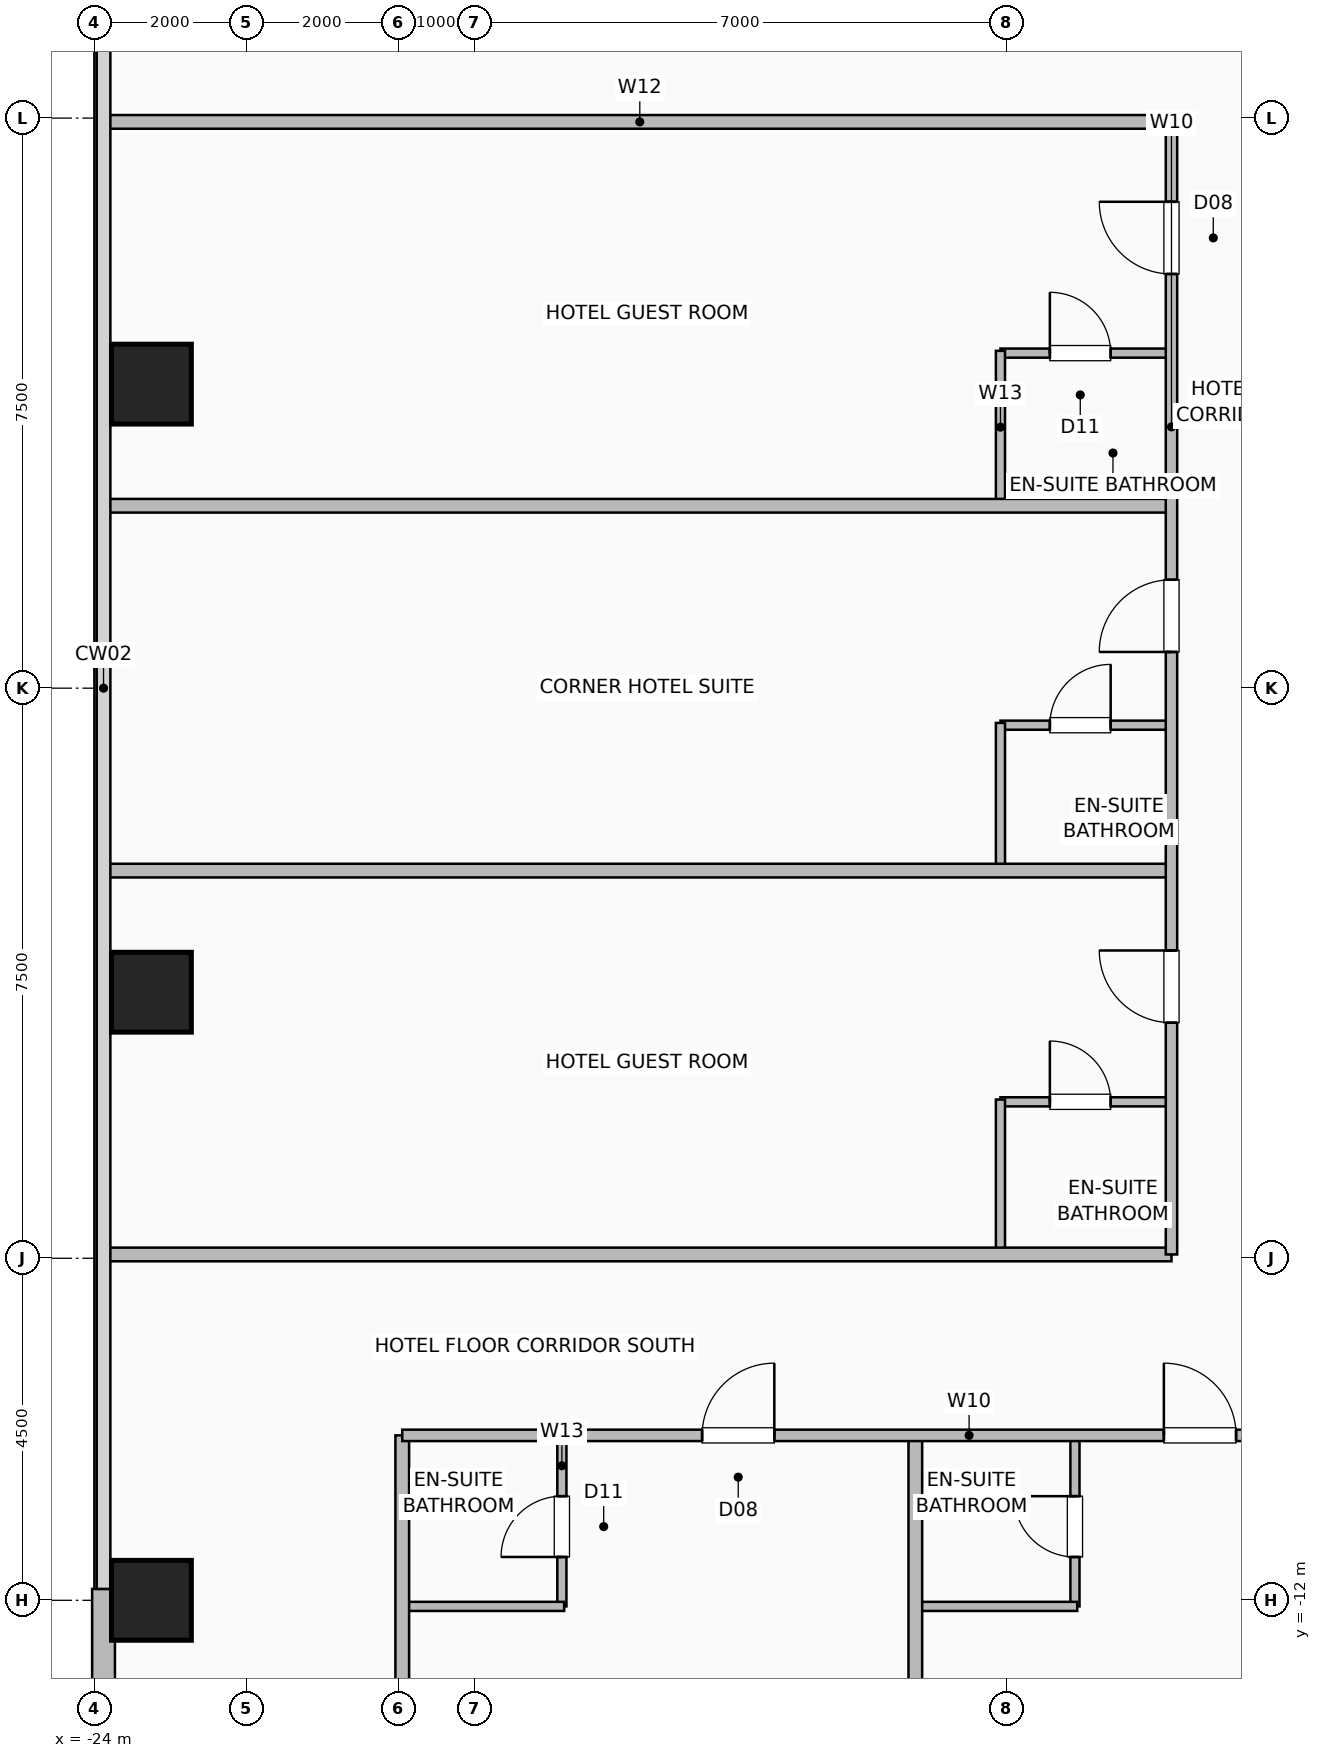
"""IFC4 building model, lengths in metres.
Left out: names, types, materials, properties, quantities, classifications, styles, units other than length and angle.
Written with IfcOpenShell. Run it as: python <this file> out.ifc"""

import sys

from ifc_helpers import new_model, si_unit, direction, frame, frame_2d, origin, origin_2d, place, context, subcontext, project, spatial, rectangle, hollow_rectangle, extrude, element, fill, save


model = new_model("IFC4")
c1 = context("Model", 3, precision=1e-05, world=origin(), true_north=direction((0.0, 1.0)))
c2 = subcontext(c1, "Body", "Model", "MODEL_VIEW")
j1 = project(units=[si_unit("LENGTHUNIT", "METRE"), si_unit("PLANEANGLEUNIT", "RADIAN")], contexts=[c1])
p1 = place(None, origin())
s1 = spatial("IfcSite", under=j1, at=p1, CompositionType="ELEMENT")
p2 = place(p1, origin())
s2 = spatial("IfcBuilding", under=s1, at=p2, CompositionType="ELEMENT")
p3 = place(p2, frame((0.0, 0.0, 34.0)))
s3 = spatial("IfcBuildingStorey", under=s2, at=p3, CompositionType="ELEMENT", Elevation=34.0)
for number, where, z_axis, x_axis in (
    (1, (-23.25, -12.0, 0.0), (0.0, 0.0, 1.0), (1.0, 0.0, 0.0)),
    (2, (-23.25, -4.0, 0.0), (0.0, 0.0, 1.0), (1.0, 0.0, 0.0)),
    (3, (-23.25, 4.0, 0.0), (0.0, 0.0, 1.0), (1.0, 0.0, 0.0)),
):
    element("IfcColumn", number, at=place(p3, frame(where, z_axis=z_axis, x_axis=x_axis)), inside=s3, PredefinedType="COLUMN", context=c2, shape_type="SweptSolid", body=[
        extrude(hollow_rectangle(XDim=1.05, YDim=1.05, WallThickness=0.05, at=origin_2d()), origin(), (0.0, 0.0, 1.0), 3.5),
    ])
p4 = place(p3, frame((-23.88, -19.15, 0.0), z_axis=(0.0, 0.0, 1.0), x_axis=(0.0, 1.0, 0.0)))
e4 = element("IfcWall", 4, at=p4, inside=s3, PredefinedType="SOLIDWALL", context=c2, shape_type="SweptSolid", body=[
    extrude(rectangle(XDim=7.3, YDim=0.3, at=frame_2d((3.65, 0.0))), origin(), (0.0, 0.0, 1.0), 3.25),
])
p5 = place(p3, frame((-17.85, -12.08, 0.0), z_axis=(0.0, 0.0, 1.0), x_axis=(0.0, 1.0, 0.0)))
e5 = element("IfcWall", 5, at=p5, inside=s3, PredefinedType="PLUMBINGWALL", context=c2, shape_type="SweptSolid", body=[
    extrude(rectangle(XDim=2.25, YDim=0.12, at=frame_2d((1.125, 0.0))), origin(), (0.0, 0.0, 1.0), 3.25),
])
p6 = place(p5, frame((0.65, 0.0, 0.0)))
e6 = element("IfcOpeningElement", 6, at=p6, cuts=e5, PredefinedType="OPENING", context=c2, shape_type="SweptSolid", body=[
    extrude(rectangle(XDim=0.8, YDim=2.05, at=frame_2d((0.4, 1.025))), frame((0.0, 0.07, 0.0), z_axis=(0.0, -1.0, 0.0), x_axis=(1.0, 0.0, 0.0)), (0.0, 0.0, 1.0), 0.14),
])
p7 = place(p3, frame((-19.92, -12.08, 0.0), z_axis=(0.0, 0.0, 1.0), x_axis=(1.0, 0.0, 0.0)))
e7 = element("IfcWall", 7, at=p7, inside=s3, PredefinedType="PLUMBINGWALL", context=c2, shape_type="SweptSolid", body=[
    extrude(rectangle(XDim=2.1, YDim=0.12, at=frame_2d((1.05, 0.0))), origin(), (0.0, 0.0, 1.0), 3.25),
])
p8 = place(p3, frame((-11.1, -12.08, 0.0), z_axis=(0.0, 0.0, 1.0), x_axis=(0.0, 1.0, 0.0)))
e8 = element("IfcWall", 8, at=p8, inside=s3, PredefinedType="PLUMBINGWALL", context=c2, shape_type="SweptSolid", body=[
    extrude(rectangle(XDim=2.25, YDim=0.12, at=frame_2d((1.125, 0.0))), origin(), (0.0, 0.0, 1.0), 3.25),
])
p9 = place(p8, frame((0.65, 0.0, 0.0)))
e9 = element("IfcOpeningElement", 9, at=p9, cuts=e8, PredefinedType="OPENING", context=c2, shape_type="SweptSolid", body=[
    extrude(rectangle(XDim=0.8, YDim=2.05, at=frame_2d((0.4, 1.025))), frame((0.0, 0.07, 0.0), z_axis=(0.0, -1.0, 0.0), x_axis=(1.0, 0.0, 0.0)), (0.0, 0.0, 1.0), 0.14),
])
p10 = place(p3, frame((-13.17, -12.08, 0.0), z_axis=(0.0, 0.0, 1.0), x_axis=(1.0, 0.0, 0.0)))
e10 = element("IfcWall", 10, at=p10, inside=s3, PredefinedType="PLUMBINGWALL", context=c2, shape_type="SweptSolid", body=[
    extrude(rectangle(XDim=2.1, YDim=0.12, at=frame_2d((1.05, 0.0))), origin(), (0.0, 0.0, 1.0), 3.25),
])
for number, where, z_axis, x_axis in (
    (11, (-19.95, -23.82, 0.0), (0.0, 0.0, 1.0), (0.0, 1.0, 0.0)),
    (12, (-13.2, -23.82, 0.0), (0.0, 0.0, 1.0), (0.0, 1.0, 0.0)),
):
    element("IfcWall", number, at=place(p3, frame(where, z_axis=z_axis, x_axis=x_axis)), inside=s3, PredefinedType="PARTITIONING", context=c2, shape_type="SweptSolid", body=[
        extrude(rectangle(XDim=13.99, YDim=0.18, at=frame_2d((6.995, 0.0))), origin(), (0.0, 0.0, 1.0), 3.25),
    ])
p11 = place(p3, frame((-19.95, -9.83, 0.0), z_axis=(0.0, 0.0, 1.0), x_axis=(1.0, 0.0, 0.0)))
e13 = element("IfcWall", 13, at=p11, inside=s3, PredefinedType="PARTITIONING", context=c2, shape_type="SweptSolid", body=[
    extrude(rectangle(XDim=39.9, YDim=0.15, at=frame_2d((19.95, 0.0))), origin(), (0.0, 0.0, 1.0), 3.25),
])
p12 = place(p11, frame((3.945, 0.0, 0.0)))
e14 = element("IfcOpeningElement", 14, at=p12, cuts=e13, PredefinedType="OPENING", context=c2, shape_type="SweptSolid", body=[
    extrude(rectangle(XDim=0.95, YDim=2.08, at=frame_2d((0.475, 1.04))), frame((0.0, 0.085, 0.0), z_axis=(0.0, -1.0, 0.0), x_axis=(1.0, 0.0, 0.0)), (0.0, 0.0, 1.0), 0.17),
])
p13 = place(p11, frame((10.02, 0.0, 0.0)))
e15 = element("IfcOpeningElement", 15, at=p13, cuts=e13, PredefinedType="OPENING", context=c2, shape_type="SweptSolid", body=[
    extrude(rectangle(XDim=0.95, YDim=2.08, at=frame_2d((0.475, 1.04))), frame((0.0, 0.085, 0.0), z_axis=(0.0, -1.0, 0.0), x_axis=(1.0, 0.0, 0.0)), (0.0, 0.0, 1.0), 0.17),
])
p14 = place(p11, frame((15.42, 0.0, 0.0)))
e16 = element("IfcOpeningElement", 16, at=p14, cuts=e13, PredefinedType="OPENING", context=c2, shape_type="SweptSolid", body=[
    extrude(rectangle(XDim=0.95, YDim=2.08, at=frame_2d((0.475, 1.04))), frame((0.0, 0.085, 0.0), z_axis=(0.0, -1.0, 0.0), x_axis=(1.0, 0.0, 0.0)), (0.0, 0.0, 1.0), 0.17),
])
p15 = place(p11, frame((20.702, 0.0, 0.0)))
e17 = element("IfcOpeningElement", 17, at=p15, cuts=e13, PredefinedType="OPENING", context=c2, shape_type="SweptSolid", body=[
    extrude(rectangle(XDim=0.95, YDim=2.08, at=frame_2d((0.475, 1.04))), frame((0.0, 0.085, 0.0), z_axis=(0.0, -1.0, 0.0), x_axis=(1.0, 0.0, 0.0)), (0.0, 0.0, 1.0), 0.17),
])
p16 = place(p11, frame((26.02, 0.0, 0.0)))
e18 = element("IfcOpeningElement", 18, at=p16, cuts=e13, PredefinedType="OPENING", context=c2, shape_type="SweptSolid", body=[
    extrude(rectangle(XDim=0.95, YDim=2.08, at=frame_2d((0.475, 1.04))), frame((0.0, 0.085, 0.0), z_axis=(0.0, -1.0, 0.0), x_axis=(1.0, 0.0, 0.0)), (0.0, 0.0, 1.0), 0.17),
])
p17 = place(p11, frame((31.37, 0.0, 0.0)))
e19 = element("IfcOpeningElement", 19, at=p17, cuts=e13, PredefinedType="OPENING", context=c2, shape_type="SweptSolid", body=[
    extrude(rectangle(XDim=0.95, YDim=2.08, at=frame_2d((0.475, 1.04))), frame((0.0, 0.085, 0.0), z_axis=(0.0, -1.0, 0.0), x_axis=(1.0, 0.0, 0.0)), (0.0, 0.0, 1.0), 0.17),
])
p18 = place(p11, frame((37.245, 0.0, 0.0)))
e20 = element("IfcOpeningElement", 20, at=p18, cuts=e13, PredefinedType="OPENING", context=c2, shape_type="SweptSolid", body=[
    extrude(rectangle(XDim=0.95, YDim=2.08, at=frame_2d((0.475, 1.04))), frame((0.0, 0.085, 0.0), z_axis=(0.0, -1.0, 0.0), x_axis=(1.0, 0.0, 0.0)), (0.0, 0.0, 1.0), 0.17),
])
p19 = place(p3, frame((-12.08, -5.442, 0.0), z_axis=(0.0, 0.0, 1.0), x_axis=(1.0, 0.0, 0.0)))
e21 = element("IfcWall", 21, at=p19, inside=s3, PredefinedType="PLUMBINGWALL", context=c2, shape_type="SweptSolid", body=[
    extrude(rectangle(XDim=2.25, YDim=0.12, at=frame_2d((1.125, 0.0))), origin(), (0.0, 0.0, 1.0), 3.25),
])
p20 = place(p19, frame((0.65, 0.0, 0.0)))
e22 = element("IfcOpeningElement", 22, at=p20, cuts=e21, PredefinedType="OPENING", context=c2, shape_type="SweptSolid", body=[
    extrude(rectangle(XDim=0.8, YDim=2.05, at=frame_2d((0.4, 1.025))), frame((0.0, 0.07, 0.0), z_axis=(0.0, -1.0, 0.0), x_axis=(1.0, 0.0, 0.0)), (0.0, 0.0, 1.0), 0.14),
])
p21 = place(p3, frame((-12.08, -7.42, 0.0), z_axis=(0.0, 0.0, 1.0), x_axis=(0.0, 1.0, 0.0)))
e23 = element("IfcWall", 23, at=p21, inside=s3, PredefinedType="PLUMBINGWALL", context=c2, shape_type="SweptSolid", body=[
    extrude(rectangle(XDim=2.008, YDim=0.12, at=frame_2d((1.004, 0.0))), origin(), (0.0, 0.0, 1.0), 3.25),
])
p22 = place(p3, frame((-12.08, -0.487, 0.0), z_axis=(0.0, 0.0, 1.0), x_axis=(1.0, 0.0, 0.0)))
e24 = element("IfcWall", 24, at=p22, inside=s3, PredefinedType="PLUMBINGWALL", context=c2, shape_type="SweptSolid", body=[
    extrude(rectangle(XDim=2.25, YDim=0.12, at=frame_2d((1.125, 0.0))), origin(), (0.0, 0.0, 1.0), 3.25),
])
p23 = place(p22, frame((0.65, 0.0, 0.0)))
e25 = element("IfcOpeningElement", 25, at=p23, cuts=e24, PredefinedType="OPENING", context=c2, shape_type="SweptSolid", body=[
    extrude(rectangle(XDim=0.8, YDim=2.05, at=frame_2d((0.4, 1.025))), frame((0.0, 0.07, 0.0), z_axis=(0.0, -1.0, 0.0), x_axis=(1.0, 0.0, 0.0)), (0.0, 0.0, 1.0), 0.14),
])
p24 = place(p3, frame((-12.08, -2.37, 0.0), z_axis=(0.0, 0.0, 1.0), x_axis=(0.0, 1.0, 0.0)))
e26 = element("IfcWall", 26, at=p24, inside=s3, PredefinedType="PLUMBINGWALL", context=c2, shape_type="SweptSolid", body=[
    extrude(rectangle(XDim=1.913, YDim=0.12, at=frame_2d((0.957, 0.0))), origin(), (0.0, 0.0, 1.0), 3.25),
])
p25 = place(p3, frame((-12.08, 4.408, 0.0), z_axis=(0.0, 0.0, 1.0), x_axis=(1.0, 0.0, 0.0)))
e27 = element("IfcWall", 27, at=p25, inside=s3, PredefinedType="PLUMBINGWALL", context=c2, shape_type="SweptSolid", body=[
    extrude(rectangle(XDim=2.25, YDim=0.12, at=frame_2d((1.125, 0.0))), origin(), (0.0, 0.0, 1.0), 3.25),
])
p26 = place(p25, frame((0.65, 0.0, 0.0)))
e28 = element("IfcOpeningElement", 28, at=p26, cuts=e27, PredefinedType="OPENING", context=c2, shape_type="SweptSolid", body=[
    extrude(rectangle(XDim=0.8, YDim=2.05, at=frame_2d((0.4, 1.025))), frame((0.0, 0.07, 0.0), z_axis=(0.0, -1.0, 0.0), x_axis=(1.0, 0.0, 0.0)), (0.0, 0.0, 1.0), 0.14),
])
p27 = place(p3, frame((-12.08, 2.43, 0.0), z_axis=(0.0, 0.0, 1.0), x_axis=(0.0, 1.0, 0.0)))
e29 = element("IfcWall", 29, at=p27, inside=s3, PredefinedType="PLUMBINGWALL", context=c2, shape_type="SweptSolid", body=[
    extrude(rectangle(XDim=2.008, YDim=0.12, at=frame_2d((1.004, 0.0))), origin(), (0.0, 0.0, 1.0), 3.25),
])
for number, where, z_axis, x_axis in (
    (30, (-23.82, -7.45, 0.0), (0.0, 0.0, 1.0), (1.0, 0.0, 0.0)),
    (31, (-23.82, -2.4, 0.0), (0.0, 0.0, 1.0), (1.0, 0.0, 0.0)),
    (32, (-23.82, 2.4, 0.0), (0.0, 0.0, 1.0), (1.0, 0.0, 0.0)),
    (33, (-23.82, 7.45, 0.0), (0.0, 0.0, 1.0), (1.0, 0.0, 0.0)),
):
    element("IfcWall", number, at=place(p3, frame(where, z_axis=z_axis, x_axis=x_axis)), inside=s3, PredefinedType="PARTITIONING", context=c2, shape_type="SweptSolid", body=[
        extrude(rectangle(XDim=13.99, YDim=0.18, at=frame_2d((6.995, 0.0))), origin(), (0.0, 0.0, 1.0), 3.25),
    ])
p28 = place(p3, frame((-9.83, -7.45, 0.0), z_axis=(0.0, 0.0, 1.0), x_axis=(0.0, 1.0, 0.0)))
e34 = element("IfcWall", 34, at=p28, inside=s3, PredefinedType="PARTITIONING", context=c2, shape_type="SweptSolid", body=[
    extrude(rectangle(XDim=14.9, YDim=0.15, at=frame_2d((7.45, 0.0))), origin(), (0.0, 0.0, 1.0), 3.25),
])
p29 = place(p28, frame((3.049, 0.0, 0.0)))
e35 = element("IfcOpeningElement", 35, at=p29, cuts=e34, PredefinedType="OPENING", context=c2, shape_type="SweptSolid", body=[
    extrude(rectangle(XDim=0.95, YDim=2.08, at=frame_2d((0.475, 1.04))), frame((0.0, 0.085, 0.0), z_axis=(0.0, -1.0, 0.0), x_axis=(1.0, 0.0, 0.0)), (0.0, 0.0, 1.0), 0.17),
])
p30 = place(p28, frame((7.927, 0.0, 0.0)))
e36 = element("IfcOpeningElement", 36, at=p30, cuts=e34, PredefinedType="OPENING", context=c2, shape_type="SweptSolid", body=[
    extrude(rectangle(XDim=0.95, YDim=2.08, at=frame_2d((0.475, 1.04))), frame((0.0, 0.085, 0.0), z_axis=(0.0, -1.0, 0.0), x_axis=(1.0, 0.0, 0.0)), (0.0, 0.0, 1.0), 0.17),
])
p31 = place(p28, frame((12.899, 0.0, 0.0)))
e37 = element("IfcOpeningElement", 37, at=p31, cuts=e34, PredefinedType="OPENING", context=c2, shape_type="SweptSolid", body=[
    extrude(rectangle(XDim=0.95, YDim=2.08, at=frame_2d((0.475, 1.04))), frame((0.0, 0.085, 0.0), z_axis=(0.0, -1.0, 0.0), x_axis=(1.0, 0.0, 0.0)), (0.0, 0.0, 1.0), 0.17),
])
p32 = place(p6, origin())
e38 = element("IfcDoor", 38, at=p32, inside=s3, OperationType="SINGLE_SWING_LEFT", PredefinedType="DOOR", context=c2, shape_type="SweptSolid", body=[
    extrude(rectangle(XDim=0.8, YDim=2.05, at=frame_2d((0.4, 1.025))), frame((0.0, 0.025, 0.0), z_axis=(0.0, -1.0, 0.0), x_axis=(1.0, 0.0, 0.0)), (0.0, 0.0, 1.0), 0.05),
])
fill(e6, e38)
p33 = place(p9, origin())
e39 = element("IfcDoor", 39, at=p33, inside=s3, OperationType="SINGLE_SWING_RIGHT", PredefinedType="DOOR", context=c2, shape_type="SweptSolid", body=[
    extrude(rectangle(XDim=0.8, YDim=2.05, at=frame_2d((0.4, 1.025))), frame((0.0, 0.025, 0.0), z_axis=(0.0, -1.0, 0.0), x_axis=(1.0, 0.0, 0.0)), (0.0, 0.0, 1.0), 0.05),
])
fill(e9, e39)
p34 = place(p12, origin())
e40 = element("IfcDoor", 40, at=p34, inside=s3, OperationType="SINGLE_SWING_RIGHT", PredefinedType="DOOR", context=c2, shape_type="SweptSolid", body=[
    extrude(rectangle(XDim=0.95, YDim=2.08, at=frame_2d((0.475, 1.04))), frame((0.0, 0.025, 0.0), z_axis=(0.0, -1.0, 0.0), x_axis=(1.0, 0.0, 0.0)), (0.0, 0.0, 1.0), 0.05),
])
fill(e14, e40)
p35 = place(p13, origin())
e41 = element("IfcDoor", 41, at=p35, inside=s3, OperationType="SINGLE_SWING_LEFT", PredefinedType="DOOR", context=c2, shape_type="SweptSolid", body=[
    extrude(rectangle(XDim=0.95, YDim=2.08, at=frame_2d((0.475, 1.04))), frame((0.0, 0.025, 0.0), z_axis=(0.0, -1.0, 0.0), x_axis=(1.0, 0.0, 0.0)), (0.0, 0.0, 1.0), 0.05),
])
fill(e15, e41)
p36 = place(p20, origin())
e42 = element("IfcDoor", 42, at=p36, inside=s3, OperationType="SINGLE_SWING_LEFT", PredefinedType="DOOR", context=c2, shape_type="SweptSolid", body=[
    extrude(rectangle(XDim=0.8, YDim=2.05, at=frame_2d((0.4, 1.025))), frame((0.0, 0.025, 0.0), z_axis=(0.0, -1.0, 0.0), x_axis=(1.0, 0.0, 0.0)), (0.0, 0.0, 1.0), 0.05),
])
fill(e22, e42)
p37 = place(p23, origin())
e43 = element("IfcDoor", 43, at=p37, inside=s3, OperationType="SINGLE_SWING_RIGHT", PredefinedType="DOOR", context=c2, shape_type="SweptSolid", body=[
    extrude(rectangle(XDim=0.8, YDim=2.05, at=frame_2d((0.4, 1.025))), frame((0.0, 0.025, 0.0), z_axis=(0.0, -1.0, 0.0), x_axis=(1.0, 0.0, 0.0)), (0.0, 0.0, 1.0), 0.05),
])
fill(e25, e43)
p38 = place(p26, origin())
e44 = element("IfcDoor", 44, at=p38, inside=s3, OperationType="SINGLE_SWING_LEFT", PredefinedType="DOOR", context=c2, shape_type="SweptSolid", body=[
    extrude(rectangle(XDim=0.8, YDim=2.05, at=frame_2d((0.4, 1.025))), frame((0.0, 0.025, 0.0), z_axis=(0.0, -1.0, 0.0), x_axis=(1.0, 0.0, 0.0)), (0.0, 0.0, 1.0), 0.05),
])
fill(e28, e44)
p39 = place(p29, origin())
e45 = element("IfcDoor", 45, at=p39, inside=s3, OperationType="SINGLE_SWING_RIGHT", PredefinedType="DOOR", context=c2, shape_type="SweptSolid", body=[
    extrude(rectangle(XDim=0.95, YDim=2.08, at=frame_2d((0.475, 1.04))), frame((0.0, 0.025, 0.0), z_axis=(0.0, -1.0, 0.0), x_axis=(1.0, 0.0, 0.0)), (0.0, 0.0, 1.0), 0.05),
])
fill(e35, e45)
p40 = place(p30, origin())
e46 = element("IfcDoor", 46, at=p40, inside=s3, OperationType="SINGLE_SWING_LEFT", PredefinedType="DOOR", context=c2, shape_type="SweptSolid", body=[
    extrude(rectangle(XDim=0.95, YDim=2.08, at=frame_2d((0.475, 1.04))), frame((0.0, 0.025, 0.0), z_axis=(0.0, -1.0, 0.0), x_axis=(1.0, 0.0, 0.0)), (0.0, 0.0, 1.0), 0.05),
])
fill(e36, e46)
p41 = place(p31, origin())
e47 = element("IfcDoor", 47, at=p41, inside=s3, OperationType="SINGLE_SWING_RIGHT", PredefinedType="DOOR", context=c2, shape_type="SweptSolid", body=[
    extrude(rectangle(XDim=0.95, YDim=2.08, at=frame_2d((0.475, 1.04))), frame((0.0, 0.025, 0.0), z_axis=(0.0, -1.0, 0.0), x_axis=(1.0, 0.0, 0.0)), (0.0, 0.0, 1.0), 0.05),
])
fill(e37, e47)
save(model, sys.argv[1])
